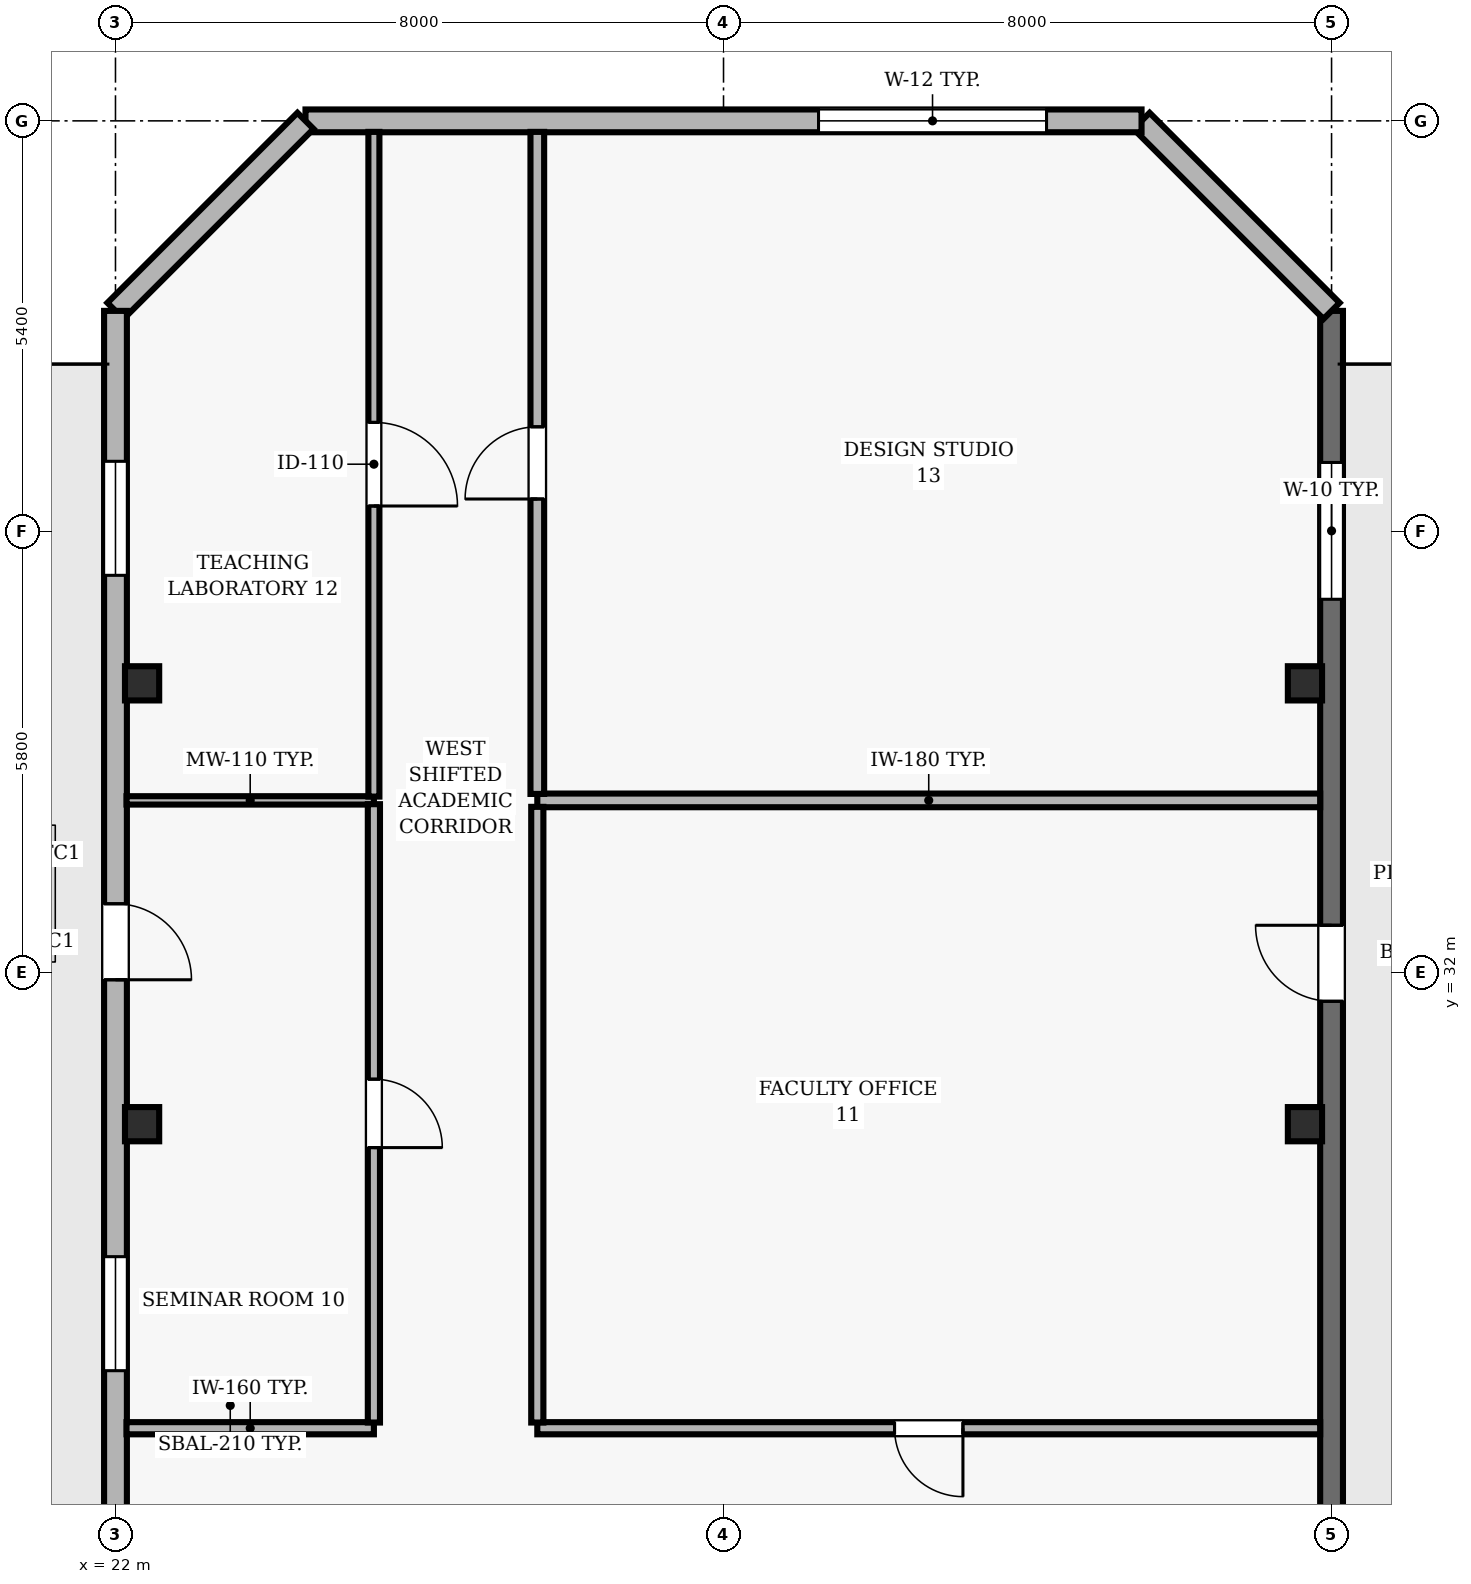
"""IFC4 building model, lengths in metres.
Left out: names, types, materials, properties, quantities, classifications, styles, units other than length and angle.
Written with IfcOpenShell. Run it as: python <this file> out.ifc"""

import sys

from ifc_helpers import new_model, si_unit, direction, frame, frame_2d, origin, origin_2d, place, context, subcontext, project, spatial, rectangle, hollow_rectangle, extrude, element, fill, save


model = new_model("IFC4")
c1 = context("Model", 3, precision=1e-05, world=origin(), true_north=direction((0.0, 1.0)))
c2 = subcontext(c1, "Body", "Model", "MODEL_VIEW")
j1 = project(units=[si_unit("LENGTHUNIT", "METRE"), si_unit("PLANEANGLEUNIT", "RADIAN")], contexts=[c1])
p1 = place(None, origin())
s1 = spatial("IfcSite", under=j1, at=p1, CompositionType="ELEMENT")
p2 = place(p1, origin())
s2 = spatial("IfcBuilding", under=s1, at=p2, CompositionType="ELEMENT")
p3 = place(p2, frame((0.0, 0.0, 203.1)))
s3 = spatial("IfcBuildingStorey", under=s2, at=p3, CompositionType="ELEMENT", Elevation=203.1)
for number, where, z_axis, x_axis in (
    (1, (22.35, 30.0, 0.0), (0.0, 0.0, 1.0), (1.0, 0.0, 0.0)),
    (2, (37.65, 30.0, 0.0), (0.0, 0.0, 1.0), (1.0, 0.0, 0.0)),
    (3, (22.35, 35.8, 0.0), (0.0, 0.0, 1.0), (1.0, 0.0, 0.0)),
    (4, (37.65, 35.8, 0.0), (0.0, 0.0, 1.0), (1.0, 0.0, 0.0)),
):
    element("IfcColumn", number, at=place(p3, frame(where, z_axis=z_axis, x_axis=x_axis)), inside=s3, PredefinedType="COLUMN", context=c2, shape_type="SweptSolid", body=[
        extrude(hollow_rectangle(XDim=0.45, YDim=0.45, WallThickness=0.02, at=origin_2d()), origin(), (0.0, 0.0, 1.0), 3.9),
    ])
p4 = place(p3, frame((38.0, 23.335, 0.0), z_axis=(0.0, 0.0, 1.0), x_axis=(0.0, 1.0, 0.0)))
e5 = element("IfcWall", 5, at=p4, inside=s3, PredefinedType="SOLIDWALL", context=c2, shape_type="SweptSolid", body=[
    extrude(rectangle(XDim=17.365, YDim=0.3, at=frame_2d((8.683, 0.0))), origin(), (0.0, 0.0, 1.0), 3.69),
])
p5 = place(p4, frame((8.282, 0.0, 0.0)))
e6 = element("IfcOpeningElement", 6, at=p5, cuts=e5, PredefinedType="OPENING", context=c2, shape_type="SweptSolid", body=[
    extrude(rectangle(XDim=1.0, YDim=2.2, at=frame_2d((0.5, 1.1))), frame((0.0, 0.16, 0.0), z_axis=(0.0, -1.0, 0.0), x_axis=(1.0, 0.0, 0.0)), (0.0, 0.0, 1.0), 0.32),
])
p6 = place(p4, frame((13.571, 0.0, 0.9)))
e7 = element("IfcOpeningElement", 7, at=p6, cuts=e5, PredefinedType="OPENING", context=c2, shape_type="SweptSolid", body=[
    extrude(rectangle(XDim=1.8, YDim=2.2, at=frame_2d((0.9, 1.1))), frame((0.0, 0.16, 0.0), z_axis=(0.0, -1.0, 0.0), x_axis=(1.0, 0.0, 0.0)), (0.0, 0.0, 1.0), 0.32),
])
p7 = place(p3, frame((38.0, 40.7, 0.0), z_axis=(0.0, 0.0, 1.0), x_axis=(-0.707106781187, 0.707106781187, 0.0)))
e8 = element("IfcWall", 8, at=p7, inside=s3, PredefinedType="SOLIDWALL", context=c2, shape_type="SweptSolid", body=[
    extrude(rectangle(XDim=3.536, YDim=0.3, at=frame_2d((1.768, 0.0))), origin(), (0.0, 0.0, 1.0), 3.69),
])
p8 = place(p3, frame((35.5, 43.2, 0.0), z_axis=(0.0, 0.0, 1.0), x_axis=(-1.0, 0.0, 0.0)))
e9 = element("IfcWall", 9, at=p8, inside=s3, PredefinedType="SOLIDWALL", context=c2, shape_type="SweptSolid", body=[
    extrude(rectangle(XDim=11.0, YDim=0.3, at=frame_2d((5.5, 0.0))), origin(), (0.0, 0.0, 1.0), 3.69),
])
p9 = place(p8, frame((1.25, 0.0, 0.9)))
e10 = element("IfcOpeningElement", 10, at=p9, cuts=e9, PredefinedType="OPENING", context=c2, shape_type="SweptSolid", body=[
    extrude(rectangle(XDim=3.0, YDim=2.2, at=frame_2d((1.5, 1.1))), frame((0.0, 0.16, 0.0), z_axis=(0.0, -1.0, 0.0), x_axis=(1.0, 0.0, 0.0)), (0.0, 0.0, 1.0), 0.32),
])
p10 = place(p3, frame((24.5, 43.2, 0.0), z_axis=(0.0, 0.0, 1.0), x_axis=(-0.707106781187, -0.707106781187, 0.0)))
e11 = element("IfcWall", 11, at=p10, inside=s3, PredefinedType="SOLIDWALL", context=c2, shape_type="SweptSolid", body=[
    extrude(rectangle(XDim=3.536, YDim=0.3, at=frame_2d((1.768, 0.0))), origin(), (0.0, 0.0, 1.0), 3.69),
])
p11 = place(p3, frame((22.0, 40.7, 0.0), z_axis=(0.0, 0.0, 1.0), x_axis=(0.0, -1.0, 0.0)))
e12 = element("IfcWall", 12, at=p11, inside=s3, PredefinedType="SOLIDWALL", context=c2, shape_type="SweptSolid", body=[
    extrude(rectangle(XDim=38.2, YDim=0.3, at=frame_2d((19.1, 0.0))), origin(), (0.0, 0.0, 1.0), 3.69),
])
p12 = place(p11, frame((7.8, 0.0, 0.0)))
e13 = element("IfcOpeningElement", 13, at=p12, cuts=e12, PredefinedType="OPENING", context=c2, shape_type="SweptSolid", body=[
    extrude(rectangle(XDim=1.0, YDim=2.2, at=frame_2d((0.5, 1.1))), frame((0.0, 0.16, 0.0), z_axis=(0.0, -1.0, 0.0), x_axis=(1.0, 0.0, 0.0)), (0.0, 0.0, 1.0), 0.32),
])
p13 = place(p11, frame((1.979, 0.0, 0.9)))
e14 = element("IfcOpeningElement", 14, at=p13, cuts=e12, PredefinedType="OPENING", context=c2, shape_type="SweptSolid", body=[
    extrude(rectangle(XDim=1.5, YDim=1.6, at=frame_2d((0.75, 0.8))), frame((0.0, 0.16, 0.0), z_axis=(0.0, -1.0, 0.0), x_axis=(1.0, 0.0, 0.0)), (0.0, 0.0, 1.0), 0.32),
])
p14 = place(p11, frame((12.443, 0.0, 0.9)))
e15 = element("IfcOpeningElement", 15, at=p14, cuts=e12, PredefinedType="OPENING", context=c2, shape_type="SweptSolid", body=[
    extrude(rectangle(XDim=1.5, YDim=1.6, at=frame_2d((0.75, 0.8))), frame((0.0, 0.16, 0.0), z_axis=(0.0, -1.0, 0.0), x_axis=(1.0, 0.0, 0.0)), (0.0, 0.0, 1.0), 0.32),
])
p15 = place(p11, frame((18.35, 0.0, 0.9)))
e16 = element("IfcOpeningElement", 16, at=p15, cuts=e12, PredefinedType="OPENING", context=c2, shape_type="SweptSolid", body=[
    extrude(rectangle(XDim=1.5, YDim=1.6, at=frame_2d((0.75, 0.8))), frame((0.0, 0.16, 0.0), z_axis=(0.0, -1.0, 0.0), x_axis=(1.0, 0.0, 0.0)), (0.0, 0.0, 1.0), 0.32),
])
p16 = place(p11, frame((23.807, 0.0, 0.9)))
e17 = element("IfcOpeningElement", 17, at=p16, cuts=e12, PredefinedType="OPENING", context=c2, shape_type="SweptSolid", body=[
    extrude(rectangle(XDim=1.5, YDim=1.6, at=frame_2d((0.75, 0.8))), frame((0.0, 0.16, 0.0), z_axis=(0.0, -1.0, 0.0), x_axis=(1.0, 0.0, 0.0)), (0.0, 0.0, 1.0), 0.32),
])
p17 = place(p11, frame((29.264, 0.0, 0.9)))
e18 = element("IfcOpeningElement", 18, at=p17, cuts=e12, PredefinedType="OPENING", context=c2, shape_type="SweptSolid", body=[
    extrude(rectangle(XDim=1.5, YDim=1.6, at=frame_2d((0.75, 0.8))), frame((0.0, 0.16, 0.0), z_axis=(0.0, -1.0, 0.0), x_axis=(1.0, 0.0, 0.0)), (0.0, 0.0, 1.0), 0.32),
])
p18 = place(p3, frame((25.4, 26.0, 0.0), z_axis=(0.0, 0.0, 1.0), x_axis=(-1.0, 0.0, 0.0)))
e19 = element("IfcWall", 19, at=p18, inside=s3, PredefinedType="PARTITIONING", context=c2, shape_type="SweptSolid", body=[
    extrude(rectangle(XDim=3.255, YDim=0.16, at=frame_2d((1.627, 0.0))), origin(), (0.0, 0.0, 1.0), 3.69),
])
p19 = place(p3, frame((25.4, 34.26, 0.0), z_axis=(0.0, 0.0, 1.0), x_axis=(-1.0, 0.0, 0.0)))
e20 = element("IfcWall", 20, at=p19, inside=s3, PredefinedType="MOVABLE", context=c2, shape_type="SweptSolid", body=[
    extrude(rectangle(XDim=3.255, YDim=0.11, at=frame_2d((1.627, 0.0))), origin(), (0.0, 0.0, 1.0), 3.69),
])
p20 = place(p3, frame((37.85, 26.0, 0.0), z_axis=(0.0, 0.0, 1.0), x_axis=(-1.0, 0.0, 0.0)))
e21 = element("IfcWall", 21, at=p20, inside=s3, PredefinedType="PARTITIONING", context=c2, shape_type="SweptSolid", body=[
    extrude(rectangle(XDim=10.3, YDim=0.16, at=frame_2d((5.15, 0.0))), origin(), (0.0, 0.0, 1.0), 3.69),
])
p21 = place(p20, frame((4.7, 0.0, 0.0)))
e22 = element("IfcOpeningElement", 22, at=p21, cuts=e21, PredefinedType="OPENING", context=c2, shape_type="SweptSolid", body=[
    extrude(rectangle(XDim=0.9, YDim=2.1, at=frame_2d((0.45, 1.05))), frame((0.0, 0.09, 0.0), z_axis=(0.0, -1.0, 0.0), x_axis=(1.0, 0.0, 0.0)), (0.0, 0.0, 1.0), 0.18),
])
p22 = place(p3, frame((37.85, 34.26, 0.0), z_axis=(0.0, 0.0, 1.0), x_axis=(-1.0, 0.0, 0.0)))
e23 = element("IfcWall", 23, at=p22, inside=s3, PredefinedType="PARTITIONING", context=c2, shape_type="SweptSolid", body=[
    extrude(rectangle(XDim=10.3, YDim=0.18, at=frame_2d((5.15, 0.0))), origin(), (0.0, 0.0, 1.0), 3.69),
])
p23 = place(p3, frame((25.4, 34.21, 0.0), z_axis=(0.0, 0.0, 1.0), x_axis=(0.0, -1.0, 0.0)))
e24 = element("IfcWall", 24, at=p23, inside=s3, PredefinedType="PARTITIONING", context=c2, shape_type="SweptSolid", body=[
    extrude(rectangle(XDim=8.135, YDim=0.16, at=frame_2d((4.067, 0.0))), origin(), (0.0, 0.0, 1.0), 3.69),
])
p24 = place(p23, frame((3.618, 0.0, 0.0)))
e25 = element("IfcOpeningElement", 25, at=p24, cuts=e24, PredefinedType="OPENING", context=c2, shape_type="SweptSolid", body=[
    extrude(rectangle(XDim=0.9, YDim=2.1, at=frame_2d((0.45, 1.05))), frame((0.0, 0.09, 0.0), z_axis=(0.0, -1.0, 0.0), x_axis=(1.0, 0.0, 0.0)), (0.0, 0.0, 1.0), 0.18),
])
p25 = place(p3, frame((25.4, 43.055, 0.0), z_axis=(0.0, 0.0, 1.0), x_axis=(0.0, -1.0, 0.0)))
e26 = element("IfcWall", 26, at=p25, inside=s3, PredefinedType="PARTITIONING", context=c2, shape_type="SweptSolid", body=[
    extrude(rectangle(XDim=8.745, YDim=0.145, at=frame_2d((4.373, 0.0))), origin(), (0.0, 0.0, 1.0), 3.69),
])
p26 = place(p25, frame((3.822, 0.0, 0.0)))
e27 = element("IfcOpeningElement", 27, at=p26, cuts=e26, PredefinedType="OPENING", context=c2, shape_type="SweptSolid", body=[
    extrude(rectangle(XDim=1.1, YDim=2.15, at=frame_2d((0.55, 1.075))), frame((0.0, 0.083, 0.0), z_axis=(0.0, -1.0, 0.0), x_axis=(1.0, 0.0, 0.0)), (0.0, 0.0, 1.0), 0.165),
])
p27 = place(p3, frame((27.55, 26.075, 0.0), z_axis=(0.0, 0.0, 1.0), x_axis=(0.0, 1.0, 0.0)))
e28 = element("IfcWall", 28, at=p27, inside=s3, PredefinedType="PARTITIONING", context=c2, shape_type="SweptSolid", body=[
    extrude(rectangle(XDim=8.1, YDim=0.16, at=frame_2d((4.05, 0.0))), origin(), (0.0, 0.0, 1.0), 3.69),
])
p28 = place(p3, frame((27.55, 34.345, 0.0), z_axis=(0.0, 0.0, 1.0), x_axis=(0.0, 1.0, 0.0)))
e29 = element("IfcWall", 29, at=p28, inside=s3, PredefinedType="PARTITIONING", context=c2, shape_type="SweptSolid", body=[
    extrude(rectangle(XDim=8.71, YDim=0.18, at=frame_2d((4.355, 0.0))), origin(), (0.0, 0.0, 1.0), 3.69),
])
p29 = place(p28, frame((3.88, 0.0, 0.0)))
e30 = element("IfcOpeningElement", 30, at=p29, cuts=e29, PredefinedType="OPENING", context=c2, shape_type="SweptSolid", body=[
    extrude(rectangle(XDim=0.95, YDim=2.1, at=frame_2d((0.475, 1.05))), frame((0.0, 0.1, 0.0), z_axis=(0.0, -1.0, 0.0), x_axis=(1.0, 0.0, 0.0)), (0.0, 0.0, 1.0), 0.2),
])
p30 = place(p5, origin())
e31 = element("IfcDoor", 31, at=p30, inside=s3, OperationType="SINGLE_SWING_RIGHT", PredefinedType="DOOR", context=c2, shape_type="SweptSolid", body=[
    extrude(rectangle(XDim=1.0, YDim=2.2, at=frame_2d((0.5, 1.1))), frame((0.0, 0.025, 0.0), z_axis=(0.0, -1.0, 0.0), x_axis=(1.0, 0.0, 0.0)), (0.0, 0.0, 1.0), 0.05),
])
fill(e6, e31)
p31 = place(p6, origin())
e32 = element("IfcWindow", 32, at=p31, inside=s3, PartitioningType="SINGLE_PANEL", PredefinedType="WINDOW", context=c2, shape_type="SweptSolid", body=[
    extrude(rectangle(XDim=1.8, YDim=2.2, at=frame_2d((0.9, 1.1))), frame((0.0, 0.03, 0.0), z_axis=(0.0, -1.0, 0.0), x_axis=(1.0, 0.0, 0.0)), (0.0, 0.0, 1.0), 0.06),
])
fill(e7, e32)
p32 = place(p9, origin())
e33 = element("IfcWindow", 33, at=p32, inside=s3, PartitioningType="SINGLE_PANEL", PredefinedType="WINDOW", context=c2, shape_type="SweptSolid", body=[
    extrude(rectangle(XDim=3.0, YDim=2.2, at=frame_2d((1.5, 1.1))), frame((0.0, 0.03, 0.0), z_axis=(0.0, -1.0, 0.0), x_axis=(1.0, 0.0, 0.0)), (0.0, 0.0, 1.0), 0.06),
])
fill(e10, e33)
p33 = place(p12, origin())
e34 = element("IfcDoor", 34, at=p33, inside=s3, OperationType="SINGLE_SWING_RIGHT", PredefinedType="DOOR", context=c2, shape_type="SweptSolid", body=[
    extrude(rectangle(XDim=1.0, YDim=2.2, at=frame_2d((0.5, 1.1))), frame((0.0, 0.025, 0.0), z_axis=(0.0, -1.0, 0.0), x_axis=(1.0, 0.0, 0.0)), (0.0, 0.0, 1.0), 0.05),
])
fill(e13, e34)
p34 = place(p13, origin())
e35 = element("IfcWindow", 35, at=p34, inside=s3, PartitioningType="SINGLE_PANEL", PredefinedType="WINDOW", context=c2, shape_type="SweptSolid", body=[
    extrude(rectangle(XDim=1.5, YDim=1.6, at=frame_2d((0.75, 0.8))), frame((0.0, 0.03, 0.0), z_axis=(0.0, -1.0, 0.0), x_axis=(1.0, 0.0, 0.0)), (0.0, 0.0, 1.0), 0.06),
])
fill(e14, e35)
p35 = place(p14, origin())
e36 = element("IfcWindow", 36, at=p35, inside=s3, PartitioningType="SINGLE_PANEL", PredefinedType="WINDOW", context=c2, shape_type="SweptSolid", body=[
    extrude(rectangle(XDim=1.5, YDim=1.6, at=frame_2d((0.75, 0.8))), frame((0.0, 0.03, 0.0), z_axis=(0.0, -1.0, 0.0), x_axis=(1.0, 0.0, 0.0)), (0.0, 0.0, 1.0), 0.06),
])
fill(e15, e36)
p36 = place(p24, origin())
e37 = element("IfcDoor", 37, at=p36, inside=s3, OperationType="SINGLE_SWING_RIGHT", PredefinedType="DOOR", context=c2, shape_type="SweptSolid", body=[
    extrude(rectangle(XDim=0.9, YDim=2.1, at=frame_2d((0.45, 1.05))), frame((0.0, 0.025, 0.0), z_axis=(0.0, -1.0, 0.0), x_axis=(1.0, 0.0, 0.0)), (0.0, 0.0, 1.0), 0.05),
])
fill(e25, e37)
p37 = place(p21, origin())
e38 = element("IfcDoor", 38, at=p37, inside=s3, OperationType="SINGLE_SWING_LEFT", PredefinedType="DOOR", context=c2, shape_type="SweptSolid", body=[
    extrude(rectangle(XDim=0.9, YDim=2.1, at=frame_2d((0.45, 1.05))), frame((0.0, 0.025, 0.0), z_axis=(0.0, -1.0, 0.0), x_axis=(1.0, 0.0, 0.0)), (0.0, 0.0, 1.0), 0.05),
])
fill(e22, e38)
p38 = place(p26, origin())
e39 = element("IfcDoor", 39, at=p38, inside=s3, OperationType="SINGLE_SWING_RIGHT", PredefinedType="DOOR", context=c2, shape_type="SweptSolid", body=[
    extrude(rectangle(XDim=1.1, YDim=2.15, at=frame_2d((0.55, 1.075))), frame((0.0, 0.025, 0.0), z_axis=(0.0, -1.0, 0.0), x_axis=(1.0, 0.0, 0.0)), (0.0, 0.0, 1.0), 0.05),
])
fill(e27, e39)
p39 = place(p29, origin())
e40 = element("IfcDoor", 40, at=p39, inside=s3, OperationType="SINGLE_SWING_LEFT", PredefinedType="DOOR", context=c2, shape_type="SweptSolid", body=[
    extrude(rectangle(XDim=0.95, YDim=2.1, at=frame_2d((0.475, 1.05))), frame((0.0, 0.025, 0.0), z_axis=(0.0, -1.0, 0.0), x_axis=(1.0, 0.0, 0.0)), (0.0, 0.0, 1.0), 0.05),
])
fill(e30, e40)
save(model, sys.argv[1])
